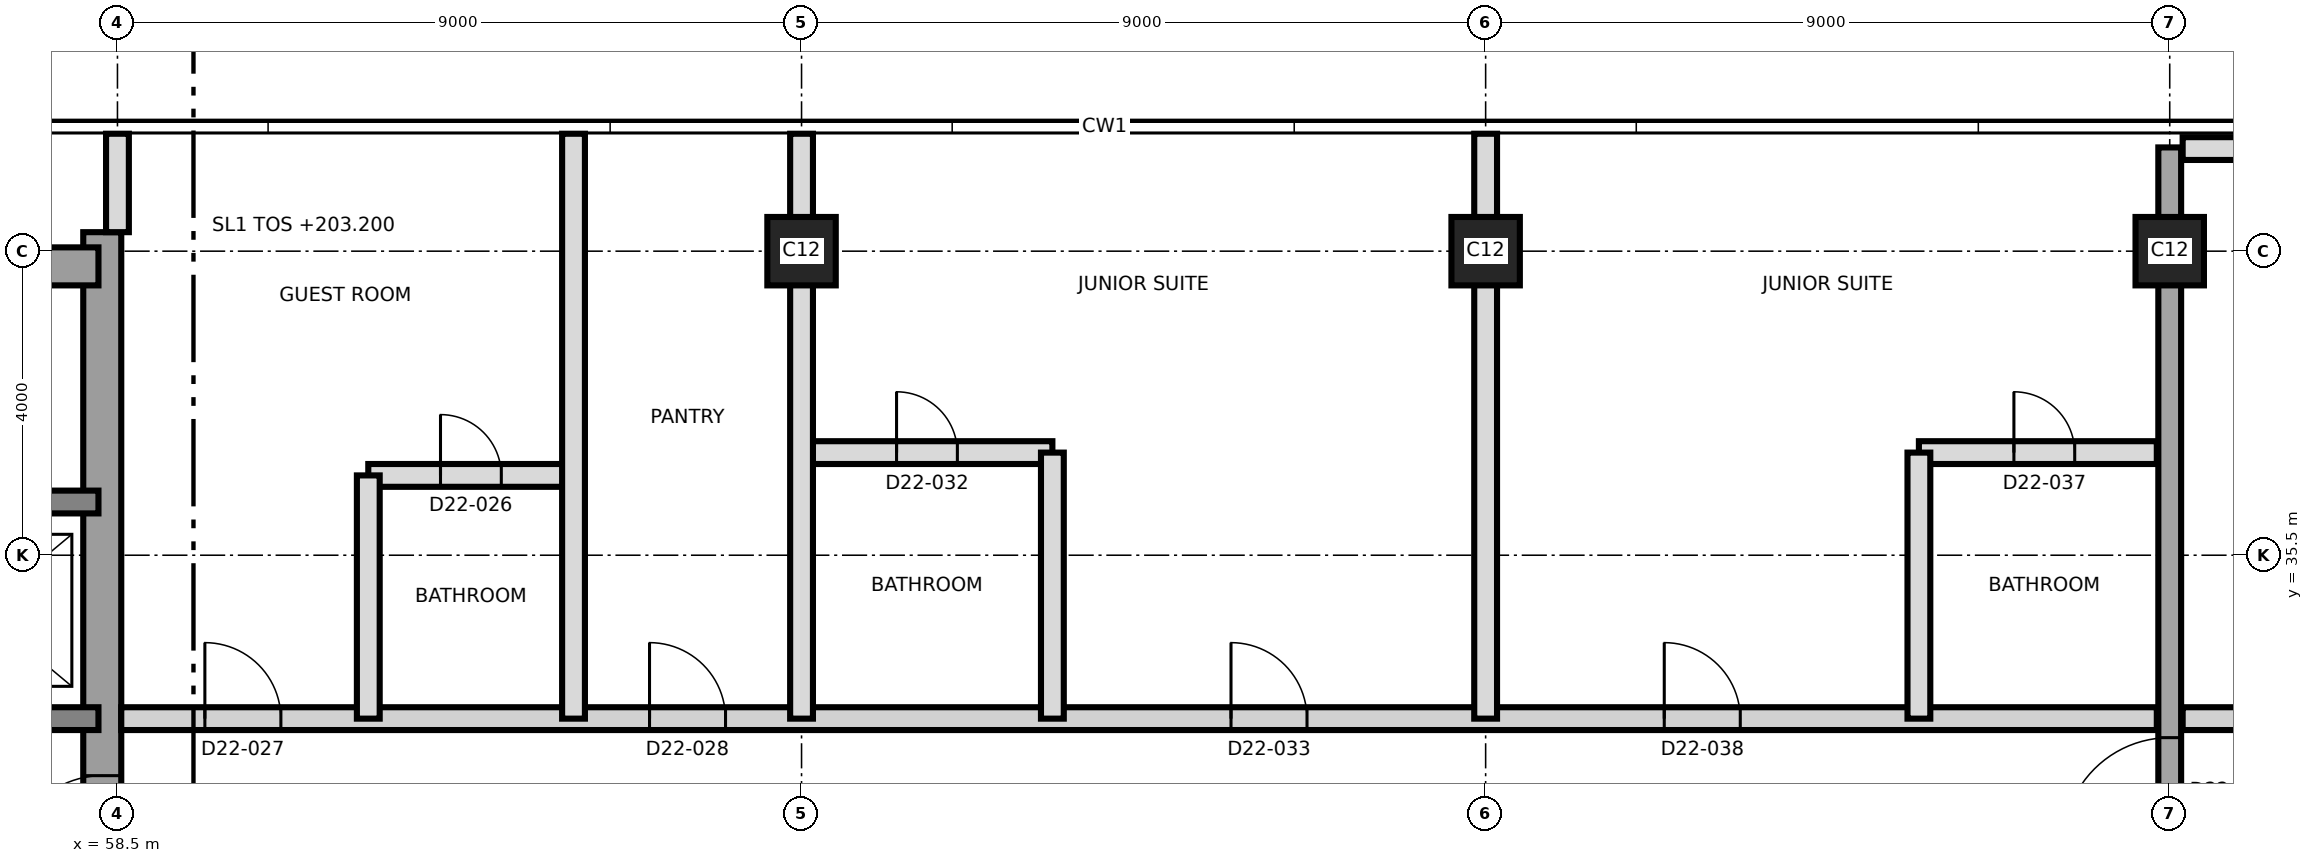
"""IFC4 building model, lengths in metres.
Left out: names, types, materials, properties, quantities, classifications, styles, units other than length and angle.
Written with IfcOpenShell. Run it as: python <this file> out.ifc"""

import sys

from ifc_helpers import new_model, si_unit, direction, frame, frame_2d, origin, origin_2d, place, context, subcontext, project, spatial, rectangle, extrude, element, fill, save


model = new_model("IFC4")
c1 = context("Model", 3, precision=1e-05, world=origin(), true_north=direction((0.0, 1.0)))
c2 = subcontext(c1, "Body", "Model", "MODEL_VIEW")
j1 = project(units=[si_unit("LENGTHUNIT", "METRE"), si_unit("PLANEANGLEUNIT", "RADIAN")], contexts=[c1])
p1 = place(None, origin())
s1 = spatial("IfcSite", under=j1, at=p1, CompositionType="ELEMENT")
p2 = place(p1, origin())
s2 = spatial("IfcBuilding", under=s1, at=p2, CompositionType="ELEMENT")
p3 = place(p2, frame((0.0, 0.0, 203.2)))
s3 = spatial("IfcBuildingStorey", under=s2, at=p3, CompositionType="ELEMENT", Elevation=203.2)
p4 = place(p3, frame((58.3, 21.25, 0.0), z_axis=(0.0, 0.0, 1.0), x_axis=(0.0, 1.0, 0.0)))
e1 = element("IfcWall", 1, at=p4, inside=s3, PredefinedType="SHEAR", context=c2, shape_type="SweptSolid", body=[
    extrude(rectangle(XDim=18.5, YDim=0.5, at=frame_2d((9.25, 0.0))), origin(), (0.0, 0.0, 1.0), 3.7),
])
p5 = place(p4, frame((10.15, 0.0, 0.0)))
e2 = element("IfcOpeningElement", 2, at=p5, cuts=e1, PredefinedType="OPENING", context=c2, shape_type="SweptSolid", body=[
    extrude(rectangle(XDim=1.2, YDim=2.1, at=frame_2d((0.6, 1.05))), frame((0.0, 0.26, 0.0), z_axis=(0.0, -1.0, 0.0), x_axis=(1.0, 0.0, 0.0)), (0.0, 0.0, 1.0), 0.52),
])
p6 = place(p3, frame((31.25, 39.3, 0.0), z_axis=(0.0, 0.0, 1.0), x_axis=(1.0, 0.0, 0.0)))
e3 = element("IfcWall", 3, at=p6, inside=s3, PredefinedType="SHEAR", context=c2, shape_type="SweptSolid", body=[
    extrude(rectangle(XDim=27.0, YDim=0.5, at=frame_2d((13.5, 0.0))), origin(), (0.0, 0.0, 1.0), 3.7),
])
p7 = place(p6, frame((10.45, 0.0, 0.0)))
e4 = element("IfcOpeningElement", 4, at=p7, cuts=e3, PredefinedType="OPENING", context=c2, shape_type="SweptSolid", body=[
    extrude(rectangle(XDim=1.2, YDim=2.1, at=frame_2d((0.6, 1.05))), frame((0.0, 0.26, 0.0), z_axis=(0.0, -1.0, 0.0), x_axis=(1.0, 0.0, 0.0)), (0.0, 0.0, 1.0), 0.52),
])
p8 = place(p3, frame((31.75, 33.35, 0.0), z_axis=(0.0, 0.0, 1.0), x_axis=(1.0, 0.0, 0.0)))
e5 = element("IfcWall", 5, at=p8, inside=s3, PredefinedType="SHEAR", context=c2, shape_type="SweptSolid", body=[
    extrude(rectangle(XDim=26.5, YDim=0.3, at=frame_2d((13.25, 0.0))), origin(), (0.0, 0.0, 1.0), 3.7),
])
p9 = place(p8, frame((13.9, 0.0, 0.0)))
e6 = element("IfcOpeningElement", 6, at=p9, cuts=e5, PredefinedType="OPENING", context=c2, shape_type="SweptSolid", body=[
    extrude(rectangle(XDim=1.4, YDim=2.1, at=frame_2d((0.7, 1.05))), frame((0.0, 0.16, 0.0), z_axis=(0.0, -1.0, 0.0), x_axis=(1.0, 0.0, 0.0)), (0.0, 0.0, 1.0), 0.32),
])
p10 = place(p8, frame((5.375, 0.0, 0.0)))
e7 = element("IfcOpeningElement", 7, at=p10, cuts=e5, PredefinedType="OPENING", context=c2, shape_type="SweptSolid", body=[
    extrude(rectangle(XDim=1.2, YDim=2.1, at=frame_2d((0.6, 1.05))), frame((0.0, 0.16, 0.0), z_axis=(0.0, -1.0, 0.0), x_axis=(1.0, 0.0, 0.0)), (0.0, 0.0, 1.0), 0.32),
])
p11 = place(p8, frame((19.925, 0.0, 0.0)))
e8 = element("IfcOpeningElement", 8, at=p11, cuts=e5, PredefinedType="OPENING", context=c2, shape_type="SweptSolid", body=[
    extrude(rectangle(XDim=1.2, YDim=2.1, at=frame_2d((0.6, 1.05))), frame((0.0, 0.16, 0.0), z_axis=(0.0, -1.0, 0.0), x_axis=(1.0, 0.0, 0.0)), (0.0, 0.0, 1.0), 0.32),
])
p12 = place(p3, frame((43.5, 36.2, 0.0), z_axis=(0.0, 0.0, 1.0), x_axis=(1.0, 0.0, 0.0)))
e9 = element("IfcWall", 9, at=p12, inside=s3, PredefinedType="SHEAR", context=c2, shape_type="SweptSolid", body=[
    extrude(rectangle(XDim=14.75, YDim=0.3, at=frame_2d((7.375, 0.0))), origin(), (0.0, 0.0, 1.0), 3.7),
])
p13 = place(p12, frame((6.9, 0.0, 0.0)))
e10 = element("IfcOpeningElement", 10, at=p13, cuts=e9, PredefinedType="OPENING", context=c2, shape_type="SweptSolid", body=[
    extrude(rectangle(XDim=1.2, YDim=2.1, at=frame_2d((0.6, 1.05))), frame((0.0, 0.16, 0.0), z_axis=(0.0, -1.0, 0.0), x_axis=(1.0, 0.0, 0.0)), (0.0, 0.0, 1.0), 0.32),
])
p14 = place(p12, frame((0.7, 0.0, 0.0)))
e11 = element("IfcOpeningElement", 11, at=p14, cuts=e9, PredefinedType="OPENING", context=c2, shape_type="SweptSolid", body=[
    extrude(rectangle(XDim=1.3, YDim=2.4, at=frame_2d((0.65, 1.2))), frame((0.0, 0.16, 0.0), z_axis=(0.0, -1.0, 0.0), x_axis=(1.0, 0.0, 0.0)), (0.0, 0.0, 1.0), 0.32),
])
p15 = place(p12, frame((3.7, 0.0, 0.0)))
e12 = element("IfcOpeningElement", 12, at=p15, cuts=e9, PredefinedType="OPENING", context=c2, shape_type="SweptSolid", body=[
    extrude(rectangle(XDim=1.3, YDim=2.4, at=frame_2d((0.65, 1.2))), frame((0.0, 0.16, 0.0), z_axis=(0.0, -1.0, 0.0), x_axis=(1.0, 0.0, 0.0)), (0.0, 0.0, 1.0), 0.32),
])
for number, where, z_axis, x_axis in (
    (13, (67.5, 39.5, 0.0), (0.0, 0.0, 1.0), (1.0, 0.0, 0.0)),
    (14, (76.5, 39.5, 0.0), (0.0, 0.0, 1.0), (1.0, 0.0, 0.0)),
    (15, (85.5, 39.5, 0.0), (0.0, 0.0, 1.0), (1.0, 0.0, 0.0)),
):
    element("IfcColumn", number, at=place(p3, frame(where, z_axis=z_axis, x_axis=x_axis)), inside=s3, PredefinedType="COLUMN", context=c2, shape_type="SweptSolid", body=[
        extrude(rectangle(XDim=0.9, YDim=0.9, at=origin_2d()), origin(), (0.0, 0.0, 1.0), 3.7),
    ])
p16 = place(p3, frame((85.5, 20.135, 0.0), z_axis=(0.0, 0.0, 1.0), x_axis=(0.0, 1.0, 0.0)))
e16 = element("IfcWall", 16, at=p16, inside=s3, PredefinedType="SHEAR", context=c2, shape_type="SweptSolid", body=[
    extrude(rectangle(XDim=20.73, YDim=0.3, at=frame_2d((10.365, 0.0))), origin(), (0.0, 0.0, 1.0), 3.7),
])
p17 = place(p16, frame((11.565, 0.0, 0.0)))
e17 = element("IfcOpeningElement", 17, at=p17, cuts=e16, PredefinedType="OPENING", context=c2, shape_type="SweptSolid", body=[
    extrude(rectangle(XDim=1.4, YDim=2.1, at=frame_2d((0.7, 1.05))), frame((0.0, 0.16, 0.0), z_axis=(0.0, -1.0, 0.0), x_axis=(1.0, 0.0, 0.0)), (0.0, 0.0, 1.0), 0.32),
])
p18 = place(p3, frame((58.55, 33.35, 0.0), z_axis=(0.0, 0.0, 1.0), x_axis=(1.0, 0.0, 0.0)))
e18 = element("IfcWall", 18, at=p18, inside=s3, PredefinedType="PARTITIONING", context=c2, shape_type="SweptSolid", body=[
    extrude(rectangle(XDim=26.78, YDim=0.3, at=frame_2d((13.39, 0.0))), origin(), (0.0, 0.0, 1.0), 3.4),
])
p19 = place(p18, frame((1.1, 0.0, 0.0)))
e19 = element("IfcOpeningElement", 19, at=p19, cuts=e18, PredefinedType="OPENING", context=c2, shape_type="SweptSolid", body=[
    extrude(rectangle(XDim=1.0, YDim=2.1, at=frame_2d((0.5, 1.05))), frame((0.0, 0.16, 0.0), z_axis=(0.0, -1.0, 0.0), x_axis=(1.0, 0.0, 0.0)), (0.0, 0.0, 1.0), 0.32),
])
p20 = place(p18, frame((6.95, 0.0, 0.0)))
e20 = element("IfcOpeningElement", 20, at=p20, cuts=e18, PredefinedType="OPENING", context=c2, shape_type="SweptSolid", body=[
    extrude(rectangle(XDim=1.0, YDim=2.1, at=frame_2d((0.5, 1.05))), frame((0.0, 0.16, 0.0), z_axis=(0.0, -1.0, 0.0), x_axis=(1.0, 0.0, 0.0)), (0.0, 0.0, 1.0), 0.32),
])
p21 = place(p18, frame((14.6, 0.0, 0.0)))
e21 = element("IfcOpeningElement", 21, at=p21, cuts=e18, PredefinedType="OPENING", context=c2, shape_type="SweptSolid", body=[
    extrude(rectangle(XDim=1.0, YDim=2.4, at=frame_2d((0.5, 1.2))), frame((0.0, 0.16, 0.0), z_axis=(0.0, -1.0, 0.0), x_axis=(1.0, 0.0, 0.0)), (0.0, 0.0, 1.0), 0.32),
])
p22 = place(p18, frame((20.3, 0.0, 0.0)))
e22 = element("IfcOpeningElement", 22, at=p22, cuts=e18, PredefinedType="OPENING", context=c2, shape_type="SweptSolid", body=[
    extrude(rectangle(XDim=1.0, YDim=2.4, at=frame_2d((0.5, 1.2))), frame((0.0, 0.16, 0.0), z_axis=(0.0, -1.0, 0.0), x_axis=(1.0, 0.0, 0.0)), (0.0, 0.0, 1.0), 0.32),
])
p23 = place(p3, frame((85.67, 33.35, 0.0), z_axis=(0.0, 0.0, 1.0), x_axis=(1.0, 0.0, 0.0)))
e23 = element("IfcWall", 23, at=p23, inside=s3, PredefinedType="PARTITIONING", context=c2, shape_type="SweptSolid", body=[
    extrude(rectangle(XDim=9.58, YDim=0.3, at=frame_2d((4.79, 0.0))), origin(), (0.0, 0.0, 1.0), 3.35),
])
p24 = place(p23, frame((1.83, 0.0, 0.0)))
e24 = element("IfcOpeningElement", 24, at=p24, cuts=e23, PredefinedType="OPENING", context=c2, shape_type="SweptSolid", body=[
    extrude(rectangle(XDim=1.0, YDim=2.1, at=frame_2d((0.5, 1.05))), frame((0.0, 0.16, 0.0), z_axis=(0.0, -1.0, 0.0), x_axis=(1.0, 0.0, 0.0)), (0.0, 0.0, 1.0), 0.32),
])
p25 = place(p23, frame((5.63, 0.0, 0.0)))
e25 = element("IfcOpeningElement", 25, at=p25, cuts=e23, PredefinedType="OPENING", context=c2, shape_type="SweptSolid", body=[
    extrude(rectangle(XDim=1.0, YDim=2.1, at=frame_2d((0.5, 1.05))), frame((0.0, 0.16, 0.0), z_axis=(0.0, -1.0, 0.0), x_axis=(1.0, 0.0, 0.0)), (0.0, 0.0, 1.0), 0.32),
])
p26 = place(p3, frame((61.8, 36.55, 0.0), z_axis=(0.0, 0.0, 1.0), x_axis=(1.0, 0.0, 0.0)))
e26 = element("IfcWall", 26, at=p26, inside=s3, PredefinedType="PARTITIONING", context=c2, shape_type="SweptSolid", body=[
    extrude(rectangle(XDim=2.7, YDim=0.3, at=frame_2d((1.35, 0.0))), origin(), (0.0, 0.0, 1.0), 3.4),
])
p27 = place(p26, frame((0.95, 0.0, 0.0)))
e27 = element("IfcOpeningElement", 27, at=p27, cuts=e26, PredefinedType="OPENING", context=c2, shape_type="SweptSolid", body=[
    extrude(rectangle(XDim=0.8, YDim=2.1, at=frame_2d((0.4, 1.05))), frame((0.0, 0.16, 0.0), z_axis=(0.0, -1.0, 0.0), x_axis=(1.0, 0.0, 0.0)), (0.0, 0.0, 1.0), 0.32),
])
p28 = place(p3, frame((67.5, 36.85, 0.0), z_axis=(0.0, 0.0, 1.0), x_axis=(1.0, 0.0, 0.0)))
e28 = element("IfcWall", 28, at=p28, inside=s3, PredefinedType="PARTITIONING", context=c2, shape_type="SweptSolid", body=[
    extrude(rectangle(XDim=3.3, YDim=0.3, at=frame_2d((1.65, 0.0))), origin(), (0.0, 0.0, 1.0), 3.4),
])
p29 = place(p28, frame((1.25, 0.0, 0.0)))
e29 = element("IfcOpeningElement", 29, at=p29, cuts=e28, PredefinedType="OPENING", context=c2, shape_type="SweptSolid", body=[
    extrude(rectangle(XDim=0.8, YDim=2.1, at=frame_2d((0.4, 1.05))), frame((0.0, 0.16, 0.0), z_axis=(0.0, -1.0, 0.0), x_axis=(1.0, 0.0, 0.0)), (0.0, 0.0, 1.0), 0.32),
])
p30 = place(p3, frame((82.2, 36.85, 0.0), z_axis=(0.0, 0.0, 1.0), x_axis=(1.0, 0.0, 0.0)))
e30 = element("IfcWall", 30, at=p30, inside=s3, PredefinedType="PARTITIONING", context=c2, shape_type="SweptSolid", body=[
    extrude(rectangle(XDim=3.13, YDim=0.3, at=frame_2d((1.565, 0.0))), origin(), (0.0, 0.0, 1.0), 3.4),
])
p31 = place(p30, frame((1.25, 0.0, 0.0)))
e31 = element("IfcOpeningElement", 31, at=p31, cuts=e30, PredefinedType="OPENING", context=c2, shape_type="SweptSolid", body=[
    extrude(rectangle(XDim=0.8, YDim=2.1, at=frame_2d((0.4, 1.05))), frame((0.0, 0.16, 0.0), z_axis=(0.0, -1.0, 0.0), x_axis=(1.0, 0.0, 0.0)), (0.0, 0.0, 1.0), 0.32),
])
p32 = place(p3, frame((85.67, 40.85, 0.0), z_axis=(0.0, 0.0, 1.0), x_axis=(1.0, 0.0, 0.0)))
e32 = element("IfcWall", 32, at=p32, inside=s3, PredefinedType="PARTITIONING", context=c2, shape_type="SweptSolid", body=[
    extrude(rectangle(XDim=1.943, YDim=0.3, at=frame_2d((0.972, 0.0))), origin(), (0.0, 0.0, 1.0), 3.35),
])
p33 = place(p3, frame((58.5, 39.75, 0.0), z_axis=(0.0, 0.0, 1.0), x_axis=(0.0, 1.0, 0.0)))
e33 = element("IfcWall", 33, at=p33, inside=s3, PredefinedType="PARTITIONING", context=c2, shape_type="SweptSolid", body=[
    extrude(rectangle(XDim=1.295, YDim=0.3, at=frame_2d((0.647, 0.0))), origin(), (0.0, 0.0, 1.0), 3.35),
])
p34 = place(p3, frame((61.8, 33.35, 0.0), z_axis=(0.0, 0.0, 1.0), x_axis=(0.0, 1.0, 0.0)))
e34 = element("IfcWall", 34, at=p34, inside=s3, PredefinedType="PARTITIONING", context=c2, shape_type="SweptSolid", body=[
    extrude(rectangle(XDim=3.2, YDim=0.3, at=frame_2d((1.6, 0.0))), origin(), (0.0, 0.0, 1.0), 3.4),
])
for number, where, z_axis, x_axis in (
    (35, (64.5, 33.35, 0.0), (0.0, 0.0, 1.0), (0.0, 1.0, 0.0)),
    (36, (67.5, 33.35, 0.0), (0.0, 0.0, 1.0), (0.0, 1.0, 0.0)),
):
    element("IfcWall", number, at=place(p3, frame(where, z_axis=z_axis, x_axis=x_axis)), inside=s3, PredefinedType="PARTITIONING", context=c2, shape_type="SweptSolid", body=[
        extrude(rectangle(XDim=7.695, YDim=0.3, at=frame_2d((3.847, 0.0))), origin(), (0.0, 0.0, 1.0), 3.35),
    ])
p35 = place(p3, frame((70.8, 33.35, 0.0), z_axis=(0.0, 0.0, 1.0), x_axis=(0.0, 1.0, 0.0)))
e37 = element("IfcWall", 37, at=p35, inside=s3, PredefinedType="PARTITIONING", context=c2, shape_type="SweptSolid", body=[
    extrude(rectangle(XDim=3.5, YDim=0.3, at=frame_2d((1.75, 0.0))), origin(), (0.0, 0.0, 1.0), 3.4),
])
p36 = place(p3, frame((76.5, 33.35, 0.0), z_axis=(0.0, 0.0, 1.0), x_axis=(0.0, 1.0, 0.0)))
e38 = element("IfcWall", 38, at=p36, inside=s3, PredefinedType="PARTITIONING", context=c2, shape_type="SweptSolid", body=[
    extrude(rectangle(XDim=7.695, YDim=0.3, at=frame_2d((3.847, 0.0))), origin(), (0.0, 0.0, 1.0), 3.35),
])
p37 = place(p3, frame((82.2, 33.35, 0.0), z_axis=(0.0, 0.0, 1.0), x_axis=(0.0, 1.0, 0.0)))
e39 = element("IfcWall", 39, at=p37, inside=s3, PredefinedType="PARTITIONING", context=c2, shape_type="SweptSolid", body=[
    extrude(rectangle(XDim=3.5, YDim=0.3, at=frame_2d((1.75, 0.0))), origin(), (0.0, 0.0, 1.0), 3.4),
])
p38 = place(p5, origin())
e40 = element("IfcDoor", 40, at=p38, inside=s3, OperationType="SINGLE_SWING_LEFT", PredefinedType="DOOR", context=c2, shape_type="SweptSolid", body=[
    extrude(rectangle(XDim=1.2, YDim=2.1, at=frame_2d((0.6, 1.05))), frame((0.0, 0.025, 0.0), z_axis=(0.0, -1.0, 0.0), x_axis=(1.0, 0.0, 0.0)), (0.0, 0.0, 1.0), 0.05),
])
fill(e2, e40)
p39 = place(p27, origin())
e41 = element("IfcDoor", 41, at=p39, inside=s3, OperationType="SINGLE_SWING_LEFT", PredefinedType="DOOR", context=c2, shape_type="SweptSolid", body=[
    extrude(rectangle(XDim=0.8, YDim=2.1, at=frame_2d((0.4, 1.05))), frame((0.0, 0.025, 0.0), z_axis=(0.0, -1.0, 0.0), x_axis=(1.0, 0.0, 0.0)), (0.0, 0.0, 1.0), 0.05),
])
fill(e27, e41)
p40 = place(p19, origin())
e42 = element("IfcDoor", 42, at=p40, inside=s3, OperationType="SINGLE_SWING_LEFT", PredefinedType="DOOR", context=c2, shape_type="SweptSolid", body=[
    extrude(rectangle(XDim=1.0, YDim=2.1, at=frame_2d((0.5, 1.05))), frame((0.0, 0.025, 0.0), z_axis=(0.0, -1.0, 0.0), x_axis=(1.0, 0.0, 0.0)), (0.0, 0.0, 1.0), 0.05),
])
fill(e19, e42)
p41 = place(p20, origin())
e43 = element("IfcDoor", 43, at=p41, inside=s3, OperationType="SINGLE_SWING_RIGHT", PredefinedType="DOOR", context=c2, shape_type="SweptSolid", body=[
    extrude(rectangle(XDim=1.0, YDim=2.1, at=frame_2d((0.5, 1.05))), frame((0.0, 0.025, 0.0), z_axis=(0.0, -1.0, 0.0), x_axis=(1.0, 0.0, 0.0)), (0.0, 0.0, 1.0), 0.05),
])
fill(e20, e43)
p42 = place(p29, origin())
e44 = element("IfcDoor", 44, at=p42, inside=s3, OperationType="SINGLE_SWING_LEFT", PredefinedType="DOOR", context=c2, shape_type="SweptSolid", body=[
    extrude(rectangle(XDim=0.8, YDim=2.1, at=frame_2d((0.4, 1.05))), frame((0.0, 0.025, 0.0), z_axis=(0.0, -1.0, 0.0), x_axis=(1.0, 0.0, 0.0)), (0.0, 0.0, 1.0), 0.05),
])
fill(e29, e44)
p43 = place(p21, origin())
e45 = element("IfcDoor", 45, at=p43, inside=s3, OperationType="SINGLE_SWING_LEFT", PredefinedType="DOOR", context=c2, shape_type="SweptSolid", body=[
    extrude(rectangle(XDim=1.0, YDim=2.4, at=frame_2d((0.5, 1.2))), frame((0.0, 0.025, 0.0), z_axis=(0.0, -1.0, 0.0), x_axis=(1.0, 0.0, 0.0)), (0.0, 0.0, 1.0), 0.05),
])
fill(e21, e45)
p44 = place(p31, origin())
e46 = element("IfcDoor", 46, at=p44, inside=s3, OperationType="SINGLE_SWING_LEFT", PredefinedType="DOOR", context=c2, shape_type="SweptSolid", body=[
    extrude(rectangle(XDim=0.8, YDim=2.1, at=frame_2d((0.4, 1.05))), frame((0.0, 0.025, 0.0), z_axis=(0.0, -1.0, 0.0), x_axis=(1.0, 0.0, 0.0)), (0.0, 0.0, 1.0), 0.05),
])
fill(e31, e46)
p45 = place(p22, origin())
e47 = element("IfcDoor", 47, at=p45, inside=s3, OperationType="SINGLE_SWING_RIGHT", PredefinedType="DOOR", context=c2, shape_type="SweptSolid", body=[
    extrude(rectangle(XDim=1.0, YDim=2.4, at=frame_2d((0.5, 1.2))), frame((0.0, 0.025, 0.0), z_axis=(0.0, -1.0, 0.0), x_axis=(1.0, 0.0, 0.0)), (0.0, 0.0, 1.0), 0.05),
])
fill(e22, e47)
p46 = place(p17, origin())
e48 = element("IfcDoor", 48, at=p46, inside=s3, OperationType="SINGLE_SWING_RIGHT", PredefinedType="DOOR", context=c2, shape_type="SweptSolid", body=[
    extrude(rectangle(XDim=1.4, YDim=2.1, at=frame_2d((0.7, 1.05))), frame((0.0, 0.025, 0.0), z_axis=(0.0, -1.0, 0.0), x_axis=(1.0, 0.0, 0.0)), (0.0, 0.0, 1.0), 0.05),
])
fill(e17, e48)
save(model, sys.argv[1])
